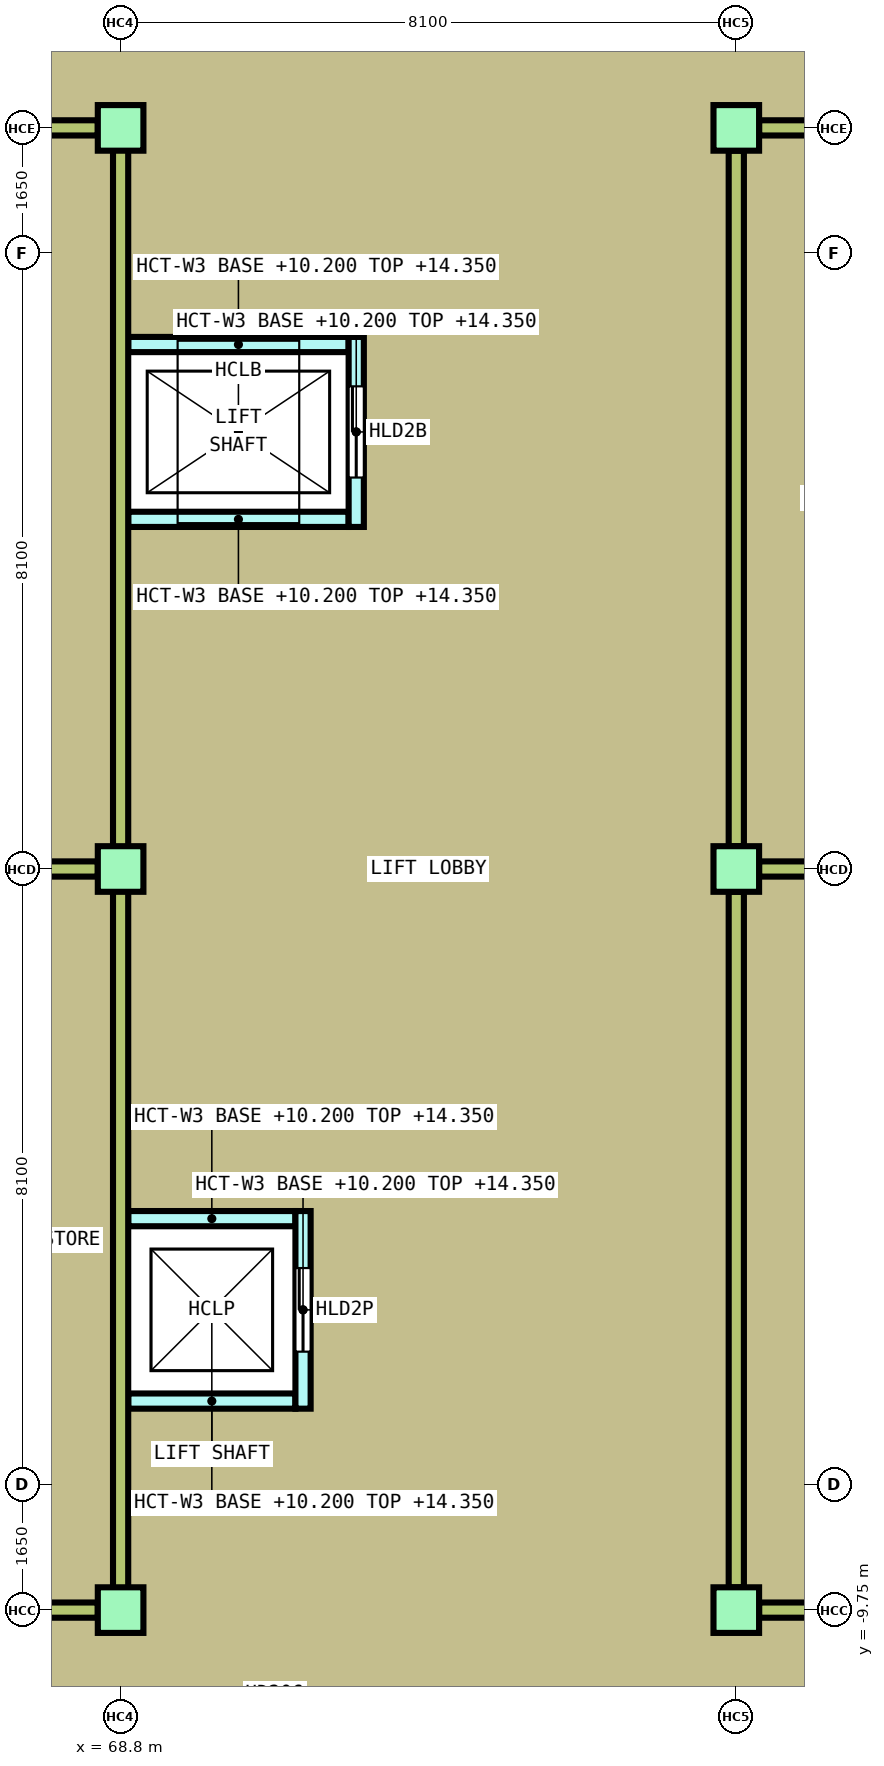
"""IFC4 building model, lengths in metres.
Left out: names, types, materials, properties, quantities, classifications, styles, units other than length and angle.
Written with IfcOpenShell. Run it as: python <this file> out.ifc"""

import sys

from ifc_helpers import new_model, si_unit, direction, frame, frame_2d, origin, origin_2d, place, context, subcontext, project, spatial, rectangle, extrude, element, fill, save


model = new_model("IFC4")
c1 = context("Model", 3, precision=1e-05, world=origin(), true_north=direction((0.0, 1.0)))
c2 = subcontext(c1, "Body", "Model", "MODEL_VIEW")
j1 = project(units=[si_unit("LENGTHUNIT", "METRE"), si_unit("PLANEANGLEUNIT", "RADIAN")], contexts=[c1])
p1 = place(None, origin())
s1 = spatial("IfcSite", under=j1, at=p1, CompositionType="ELEMENT")
p2 = place(p1, origin())
s2 = spatial("IfcBuilding", under=s1, at=p2, CompositionType="ELEMENT")
p3 = place(p2, frame((0.0, 0.0, 10.2)))
s3 = spatial("IfcBuildingStorey", under=s2, at=p3, CompositionType="ELEMENT", Elevation=10.2)
for number, where, z_axis, x_axis in (
    (1, (68.8, -9.75, 0.0), (0.0, 0.0, 1.0), (1.0, 0.0, 0.0)),
    (2, (76.9, -9.75, 0.0), (0.0, 0.0, 1.0), (1.0, 0.0, 0.0)),
    (3, (68.8, 0.0, 0.0), (0.0, 0.0, 1.0), (1.0, 0.0, 0.0)),
    (4, (76.9, 0.0, 0.0), (0.0, 0.0, 1.0), (1.0, 0.0, 0.0)),
    (5, (68.8, 9.75, 0.0), (0.0, 0.0, 1.0), (1.0, 0.0, 0.0)),
    (6, (76.9, 9.75, 0.0), (0.0, 0.0, 1.0), (1.0, 0.0, 0.0)),
):
    element("IfcColumn", number, at=place(p3, frame(where, z_axis=z_axis, x_axis=x_axis)), inside=s3, PredefinedType="COLUMN", context=c2, shape_type="SweptSolid", body=[
        extrude(rectangle(XDim=0.6, YDim=0.6, at=origin_2d()), origin(), (0.0, 0.0, 1.0), 4.15),
    ])
for number, where, z_axis, x_axis in (
    (7, (68.9, -7.0, 0.0), (0.0, 0.0, 1.0), (1.0, 0.0, 0.0)),
    (8, (68.9, -4.6, 0.0), (0.0, 0.0, 1.0), (1.0, 0.0, 0.0)),
):
    element("IfcWall", number, at=place(p3, frame(where, z_axis=z_axis, x_axis=x_axis)), inside=s3, PredefinedType="SOLIDWALL", context=c2, shape_type="SweptSolid", body=[
        extrude(rectangle(XDim=2.2, YDim=0.2, at=frame_2d((1.1, 0.0))), origin(), (0.0, 0.0, 1.0), 4.15),
    ])
p4 = place(p3, frame((71.2, -7.1, 0.0), z_axis=(0.0, 0.0, 1.0), x_axis=(0.0, 1.0, 0.0)))
e9 = element("IfcWall", 9, at=p4, inside=s3, PredefinedType="SOLIDWALL", context=c2, shape_type="SweptSolid", body=[
    extrude(rectangle(XDim=2.6, YDim=0.2, at=frame_2d((1.3, 0.0))), origin(), (0.0, 0.0, 1.0), 4.15),
])
p5 = place(p4, frame((0.75, 0.0, 0.0)))
e10 = element("IfcOpeningElement", 10, at=p5, cuts=e9, PredefinedType="OPENING", context=c2, shape_type="SweptSolid", body=[
    extrude(rectangle(XDim=1.1, YDim=2.1, at=frame_2d((0.55, 1.05))), frame((0.0, 0.11, 0.0), z_axis=(0.0, -1.0, 0.0), x_axis=(1.0, 0.0, 0.0)), (0.0, 0.0, 1.0), 0.22),
])
for number, where, z_axis, x_axis in (
    (11, (68.9, 4.6, 0.0), (0.0, 0.0, 1.0), (1.0, 0.0, 0.0)),
    (12, (68.9, 6.9, 0.0), (0.0, 0.0, 1.0), (1.0, 0.0, 0.0)),
):
    element("IfcWall", number, at=place(p3, frame(where, z_axis=z_axis, x_axis=x_axis)), inside=s3, PredefinedType="SOLIDWALL", context=c2, shape_type="SweptSolid", body=[
        extrude(rectangle(XDim=2.9, YDim=0.2, at=frame_2d((1.45, 0.0))), origin(), (0.0, 0.0, 1.0), 4.15),
    ])
p6 = place(p3, frame((71.9, 4.5, 0.0), z_axis=(0.0, 0.0, 1.0), x_axis=(0.0, 1.0, 0.0)))
e13 = element("IfcWall", 13, at=p6, inside=s3, PredefinedType="SOLIDWALL", context=c2, shape_type="SweptSolid", body=[
    extrude(rectangle(XDim=2.5, YDim=0.2, at=frame_2d((1.25, 0.0))), origin(), (0.0, 0.0, 1.0), 4.15),
])
p7 = place(p6, frame((0.65, 0.0, 0.0)))
e14 = element("IfcOpeningElement", 14, at=p7, cuts=e13, PredefinedType="OPENING", context=c2, shape_type="SweptSolid", body=[
    extrude(rectangle(XDim=1.2, YDim=2.1, at=frame_2d((0.6, 1.05))), frame((0.0, 0.11, 0.0), z_axis=(0.0, -1.0, 0.0), x_axis=(1.0, 0.0, 0.0)), (0.0, 0.0, 1.0), 0.22),
])
p8 = place(p3, frame((68.8, -9.75, 0.0), z_axis=(0.0, 0.0, 1.0), x_axis=(0.0, 1.0, 0.0)))
e15 = element("IfcWall", 15, at=p8, inside=s3, PredefinedType="PARTITIONING", context=c2, shape_type="SweptSolid", body=[
    extrude(rectangle(XDim=19.5, YDim=0.2, at=frame_2d((9.75, 0.0))), origin(), (0.0, 0.0, 1.0), 3.6),
])
for number, where, z_axis, x_axis in (
    (16, (76.9, -9.45, 0.0), (0.0, 0.0, 1.0), (0.0, 1.0, 0.0)),
    (17, (76.9, 0.3, 0.0), (0.0, 0.0, 1.0), (0.0, 1.0, 0.0)),
):
    element("IfcWall", number, at=place(p3, frame(where, z_axis=z_axis, x_axis=x_axis)), inside=s3, PredefinedType="PARTITIONING", context=c2, shape_type="SweptSolid", body=[
        extrude(rectangle(XDim=9.15, YDim=0.2, at=frame_2d((4.575, 0.0))), origin(), (0.0, 0.0, 1.0), 3.6),
    ])
p9 = place(p3, frame((61.0, -9.75, 0.0), z_axis=(0.0, 0.0, 1.0), x_axis=(1.0, 0.0, 0.0)))
e18 = element("IfcWall", 18, at=p9, inside=s3, PredefinedType="PARTITIONING", context=c2, shape_type="SweptSolid", body=[
    extrude(rectangle(XDim=7.5, YDim=0.2, at=frame_2d((3.75, 0.0))), origin(), (0.0, 0.0, 1.0), 3.6),
])
p10 = place(p9, frame((5.275, 0.0, 0.0)))
e19 = element("IfcOpeningElement", 19, at=p10, cuts=e18, PredefinedType="OPENING", context=c2, shape_type="SweptSolid", body=[
    extrude(rectangle(XDim=1.0, YDim=2.1, at=frame_2d((0.5, 1.05))), frame((0.0, 0.11, 0.0), z_axis=(0.0, -1.0, 0.0), x_axis=(1.0, 0.0, 0.0)), (0.0, 0.0, 1.0), 0.22),
])
p11 = place(p3, frame((77.2, -9.75, 0.0), z_axis=(0.0, 0.0, 1.0), x_axis=(1.0, 0.0, 0.0)))
e20 = element("IfcWall", 20, at=p11, inside=s3, PredefinedType="PARTITIONING", context=c2, shape_type="SweptSolid", body=[
    extrude(rectangle(XDim=7.5, YDim=0.2, at=frame_2d((3.75, 0.0))), origin(), (0.0, 0.0, 1.0), 3.6),
])
p12 = place(p11, frame((1.225, 0.0, 0.0)))
e21 = element("IfcOpeningElement", 21, at=p12, cuts=e20, PredefinedType="OPENING", context=c2, shape_type="SweptSolid", body=[
    extrude(rectangle(XDim=1.0, YDim=2.1, at=frame_2d((0.5, 1.05))), frame((0.0, 0.11, 0.0), z_axis=(0.0, -1.0, 0.0), x_axis=(1.0, 0.0, 0.0)), (0.0, 0.0, 1.0), 0.22),
])
p13 = place(p11, frame((4.875, 0.0, 0.0)))
e22 = element("IfcOpeningElement", 22, at=p13, cuts=e20, PredefinedType="OPENING", context=c2, shape_type="SweptSolid", body=[
    extrude(rectangle(XDim=1.8, YDim=2.1, at=frame_2d((0.9, 1.05))), frame((0.0, 0.11, 0.0), z_axis=(0.0, -1.0, 0.0), x_axis=(1.0, 0.0, 0.0)), (0.0, 0.0, 1.0), 0.22),
])
for number, where, z_axis, x_axis in (
    (23, (61.0, 0.0, 0.0), (0.0, 0.0, 1.0), (1.0, 0.0, 0.0)),
    (24, (77.2, 0.0, 0.0), (0.0, 0.0, 1.0), (1.0, 0.0, 0.0)),
):
    element("IfcWall", number, at=place(p3, frame(where, z_axis=z_axis, x_axis=x_axis)), inside=s3, PredefinedType="PARTITIONING", context=c2, shape_type="SweptSolid", body=[
        extrude(rectangle(XDim=7.5, YDim=0.2, at=frame_2d((3.75, 0.0))), origin(), (0.0, 0.0, 1.0), 3.6),
    ])
p14 = place(p3, frame((61.712, 9.75, 0.0), z_axis=(0.0, 0.0, 1.0), x_axis=(1.0, 0.0, 0.0)))
e25 = element("IfcWall", 25, at=p14, inside=s3, PredefinedType="PARTITIONING", context=c2, shape_type="SweptSolid", body=[
    extrude(rectangle(XDim=6.788, YDim=0.2, at=frame_2d((3.394, 0.0))), origin(), (0.0, 0.0, 1.0), 3.6),
])
p15 = place(p14, frame((1.525, 0.0, 0.0)))
e26 = element("IfcOpeningElement", 26, at=p15, cuts=e25, PredefinedType="OPENING", context=c2, shape_type="SweptSolid", body=[
    extrude(rectangle(XDim=1.0, YDim=2.1, at=frame_2d((0.5, 1.05))), frame((0.0, 0.11, 0.0), z_axis=(0.0, -1.0, 0.0), x_axis=(1.0, 0.0, 0.0)), (0.0, 0.0, 1.0), 0.22),
])
p16 = place(p3, frame((77.2, 9.75, 0.0), z_axis=(0.0, 0.0, 1.0), x_axis=(1.0, 0.0, 0.0)))
e27 = element("IfcWall", 27, at=p16, inside=s3, PredefinedType="PARTITIONING", context=c2, shape_type="SweptSolid", body=[
    extrude(rectangle(XDim=7.5, YDim=0.2, at=frame_2d((3.75, 0.0))), origin(), (0.0, 0.0, 1.0), 3.6),
])
p17 = place(p16, frame((1.225, 0.0, 0.0)))
e28 = element("IfcOpeningElement", 28, at=p17, cuts=e27, PredefinedType="OPENING", context=c2, shape_type="SweptSolid", body=[
    extrude(rectangle(XDim=1.0, YDim=2.1, at=frame_2d((0.5, 1.05))), frame((0.0, 0.11, 0.0), z_axis=(0.0, -1.0, 0.0), x_axis=(1.0, 0.0, 0.0)), (0.0, 0.0, 1.0), 0.22),
])
p18 = place(p16, frame((5.275, 0.0, 0.0)))
e29 = element("IfcOpeningElement", 29, at=p18, cuts=e27, PredefinedType="OPENING", context=c2, shape_type="SweptSolid", body=[
    extrude(rectangle(XDim=1.0, YDim=2.1, at=frame_2d((0.5, 1.05))), frame((0.0, 0.11, 0.0), z_axis=(0.0, -1.0, 0.0), x_axis=(1.0, 0.0, 0.0)), (0.0, 0.0, 1.0), 0.22),
])
p19 = place(p5, origin())
e30 = element("IfcDoor", 30, at=p19, inside=s3, OperationType="SLIDING_TO_LEFT", PredefinedType="DOOR", context=c2, shape_type="SweptSolid", body=[
    extrude(rectangle(XDim=1.1, YDim=2.1, at=frame_2d((0.55, 1.05))), frame((0.0, 0.025, 0.0), z_axis=(0.0, -1.0, 0.0), x_axis=(1.0, 0.0, 0.0)), (0.0, 0.0, 1.0), 0.05),
])
fill(e10, e30)
p20 = place(p7, origin())
e31 = element("IfcDoor", 31, at=p20, inside=s3, OperationType="SLIDING_TO_LEFT", PredefinedType="DOOR", context=c2, shape_type="SweptSolid", body=[
    extrude(rectangle(XDim=1.2, YDim=2.1, at=frame_2d((0.6, 1.05))), frame((0.0, 0.025, 0.0), z_axis=(0.0, -1.0, 0.0), x_axis=(1.0, 0.0, 0.0)), (0.0, 0.0, 1.0), 0.05),
])
fill(e14, e31)
save(model, sys.argv[1])
